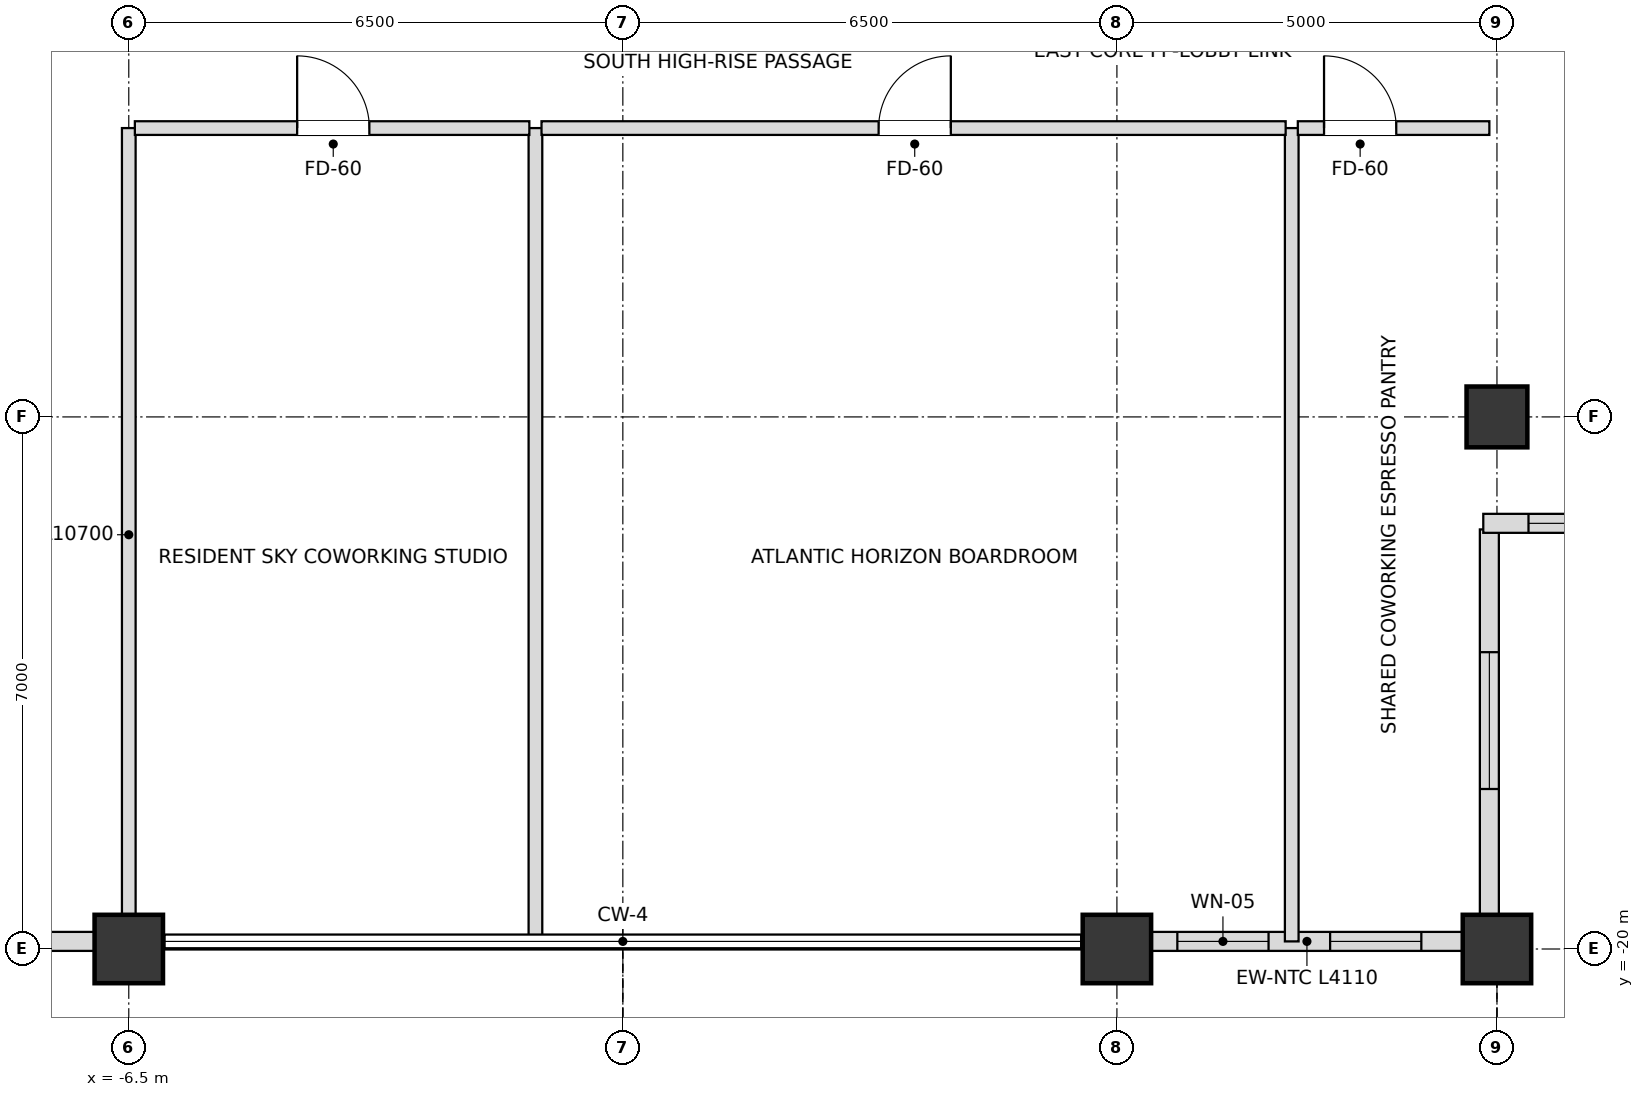
"""IFC4 building model, lengths in metres.
Left out: names, types, materials, properties, quantities, classifications, styles, units other than length and angle.
Written with IfcOpenShell. Run it as: python <this file> out.ifc"""

import sys

from ifc_helpers import new_model, si_unit, direction, frame, frame_2d, origin, origin_2d, place, context, subcontext, project, spatial, rectangle, extrude, element, fill, save


model = new_model("IFC4")
c1 = context("Model", 3, precision=1e-05, world=origin(), true_north=direction((0.0, 1.0)))
c2 = subcontext(c1, "Body", "Model", "MODEL_VIEW")
j1 = project(units=[si_unit("LENGTHUNIT", "METRE"), si_unit("PLANEANGLEUNIT", "RADIAN")], contexts=[c1])
p1 = place(None, origin())
s1 = spatial("IfcSite", under=j1, at=p1, CompositionType="ELEMENT")
p2 = place(p1, origin())
s2 = spatial("IfcBuilding", under=s1, at=p2, CompositionType="ELEMENT")
p3 = place(p2, frame((0.0, 0.0, 251.1)))
s3 = spatial("IfcBuildingStorey", under=s2, at=p3, CompositionType="ELEMENT", Elevation=251.1)
for number, where, z_axis, x_axis in (
    (1, (-6.5, -20.0, 0.0), (0.0, 0.0, 1.0), (1.0, 0.0, 0.0)),
    (2, (6.5, -20.0, 0.0), (0.0, 0.0, 1.0), (1.0, 0.0, 0.0)),
    (3, (11.5, -20.0, 0.0), (0.0, 0.0, 1.0), (1.0, 0.0, 0.0)),
):
    element("IfcColumn", number, at=place(p3, frame(where, z_axis=z_axis, x_axis=x_axis)), inside=s3, PredefinedType="USERDEFINED", context=c2, shape_type="SweptSolid", body=[
        extrude(rectangle(XDim=0.9, YDim=0.9, at=origin_2d()), origin(), (0.0, 0.0, 1.0), 3.6),
    ])
p4 = place(p3, frame((11.5, -13.0, 0.0), z_axis=(0.0, 0.0, 1.0), x_axis=(1.0, 0.0, 0.0)))
e4 = element("IfcColumn", 4, at=p4, inside=s3, PredefinedType="COLUMN", context=c2, shape_type="SweptSolid", body=[
    extrude(rectangle(XDim=0.8, YDim=0.8, at=origin_2d()), origin(), (0.0, 0.0, 1.0), 3.6),
])
p5 = place(p3, frame((-11.055, -19.9, 0.0), z_axis=(0.0, 0.0, 1.0), x_axis=(1.0, 0.0, 0.0)))
e5 = element("IfcWall", 5, at=p5, inside=s3, PredefinedType="SOLIDWALL", context=c2, shape_type="SweptSolid", body=[
    extrude(rectangle(XDim=4.11, YDim=0.25, at=frame_2d((2.055, 0.0))), origin(), (0.0, 0.0, 1.0), 2.748),
])
p6 = place(p5, frame((1.155, 0.0, 0.72)))
e6 = element("IfcOpeningElement", 6, at=p6, cuts=e5, PredefinedType="OPENING", context=c2, shape_type="SweptSolid", body=[
    extrude(rectangle(XDim=1.8, YDim=1.68, at=frame_2d((0.9, 0.84))), frame((0.0, 0.135, 0.0), z_axis=(0.0, -1.0, 0.0), x_axis=(1.0, 0.0, 0.0)), (0.0, 0.0, 1.0), 0.27),
])
p7 = place(p3, frame((6.945, -19.9, 0.0), z_axis=(0.0, 0.0, 1.0), x_axis=(1.0, 0.0, 0.0)))
e7 = element("IfcWall", 7, at=p7, inside=s3, PredefinedType="SOLIDWALL", context=c2, shape_type="SweptSolid", body=[
    extrude(rectangle(XDim=4.11, YDim=0.25, at=frame_2d((2.055, 0.0))), origin(), (0.0, 0.0, 1.0), 2.748),
])
p8 = place(p7, frame((0.35, 0.0, 0.72)))
e8 = element("IfcOpeningElement", 8, at=p8, cuts=e7, PredefinedType="OPENING", context=c2, shape_type="SweptSolid", body=[
    extrude(rectangle(XDim=1.2, YDim=1.68, at=frame_2d((0.6, 0.84))), frame((0.0, 0.135, 0.0), z_axis=(0.0, -1.0, 0.0), x_axis=(1.0, 0.0, 0.0)), (0.0, 0.0, 1.0), 0.27),
])
p9 = place(p7, frame((2.36, 0.0, 0.72)))
e9 = element("IfcOpeningElement", 9, at=p9, cuts=e7, PredefinedType="OPENING", context=c2, shape_type="SweptSolid", body=[
    extrude(rectangle(XDim=1.2, YDim=1.68, at=frame_2d((0.6, 0.84))), frame((0.0, 0.135, 0.0), z_axis=(0.0, -1.0, 0.0), x_axis=(1.0, 0.0, 0.0)), (0.0, 0.0, 1.0), 0.27),
])
p10 = place(p3, frame((11.4, -19.82, 0.0), z_axis=(0.0, 0.0, 1.0), x_axis=(0.0, 1.0, 0.0)))
e10 = element("IfcWall", 10, at=p10, inside=s3, PredefinedType="SOLIDWALL", context=c2, shape_type="SweptSolid", body=[
    extrude(rectangle(XDim=5.34, YDim=0.25, at=frame_2d((2.67, 0.0))), origin(), (0.0, 0.0, 1.0), 2.748),
])
p11 = place(p10, frame((1.925, 0.0, 0.72)))
e11 = element("IfcOpeningElement", 11, at=p11, cuts=e10, PredefinedType="OPENING", context=c2, shape_type="SweptSolid", body=[
    extrude(rectangle(XDim=1.8, YDim=1.68, at=frame_2d((0.9, 0.84))), frame((0.0, 0.135, 0.0), z_axis=(0.0, -1.0, 0.0), x_axis=(1.0, 0.0, 0.0)), (0.0, 0.0, 1.0), 0.27),
])
p12 = place(p3, frame((11.32, -14.4, 0.0), z_axis=(0.0, 0.0, 1.0), x_axis=(1.0, 0.0, 0.0)))
e12 = element("IfcWall", 12, at=p12, inside=s3, PredefinedType="SOLIDWALL", context=c2, shape_type="SweptSolid", body=[
    extrude(rectangle(XDim=5.66, YDim=0.25, at=frame_2d((2.83, 0.0))), origin(), (0.0, 0.0, 1.0), 2.748),
])
p13 = place(p12, frame((0.595, 0.0, 0.72)))
e13 = element("IfcOpeningElement", 13, at=p13, cuts=e12, PredefinedType="OPENING", context=c2, shape_type="SweptSolid", body=[
    extrude(rectangle(XDim=1.8, YDim=1.68, at=frame_2d((0.9, 0.84))), frame((0.0, 0.135, 0.0), z_axis=(0.0, -1.0, 0.0), x_axis=(1.0, 0.0, 0.0)), (0.0, 0.0, 1.0), 0.27),
])
p14 = place(p12, frame((3.265, 0.0, 0.72)))
e14 = element("IfcOpeningElement", 14, at=p14, cuts=e12, PredefinedType="OPENING", context=c2, shape_type="SweptSolid", body=[
    extrude(rectangle(XDim=1.8, YDim=1.68, at=frame_2d((0.9, 0.84))), frame((0.0, 0.135, 0.0), z_axis=(0.0, -1.0, 0.0), x_axis=(1.0, 0.0, 0.0)), (0.0, 0.0, 1.0), 0.27),
])
p15 = place(p3, frame((-6.5, -19.9, 0.0), z_axis=(0.0, 0.0, 1.0), x_axis=(0.0, 1.0, 0.0)))
e15 = element("IfcWall", 15, at=p15, inside=s3, PredefinedType="PARTITIONING", context=c2, shape_type="SweptSolid", body=[
    extrude(rectangle(XDim=10.7, YDim=0.18, at=frame_2d((5.35, 0.0))), origin(), (0.0, 0.0, 1.0), 2.826),
])
p16 = place(p3, frame((-1.15, -19.9, 0.0), z_axis=(0.0, 0.0, 1.0), x_axis=(0.0, 1.0, 0.0)))
e16 = element("IfcWall", 16, at=p16, inside=s3, PredefinedType="PARTITIONING", context=c2, shape_type="SweptSolid", body=[
    extrude(rectangle(XDim=10.7, YDim=0.18, at=frame_2d((5.35, 0.0))), origin(), (0.0, 0.0, 1.0), 3.018),
])
p17 = place(p3, frame((8.8, -19.9, 0.0), z_axis=(0.0, 0.0, 1.0), x_axis=(0.0, 1.0, 0.0)))
e17 = element("IfcWall", 17, at=p17, inside=s3, PredefinedType="PARTITIONING", context=c2, shape_type="SweptSolid", body=[
    extrude(rectangle(XDim=10.7, YDim=0.18, at=frame_2d((5.35, 0.0))), origin(), (0.0, 0.0, 1.0), 2.826),
])
p18 = place(p3, frame((-6.42, -9.2, 0.0), z_axis=(0.0, 0.0, 1.0), x_axis=(1.0, 0.0, 0.0)))
e18 = element("IfcWall", 18, at=p18, inside=s3, PredefinedType="PARTITIONING", context=c2, shape_type="SweptSolid", body=[
    extrude(rectangle(XDim=5.19, YDim=0.18, at=frame_2d((2.595, 0.0))), origin(), (0.0, 0.0, 1.0), 3.38),
])
p19 = place(p18, frame((2.135, 0.0, 0.0)))
e19 = element("IfcOpeningElement", 19, at=p19, cuts=e18, PredefinedType="OPENING", context=c2, shape_type="SweptSolid", body=[
    extrude(rectangle(XDim=0.95, YDim=2.15, at=frame_2d((0.475, 1.075))), frame((0.0, 0.1, 0.0), z_axis=(0.0, -1.0, 0.0), x_axis=(1.0, 0.0, 0.0)), (0.0, 0.0, 1.0), 0.2),
])
p20 = place(p3, frame((-1.07, -9.2, 0.0), z_axis=(0.0, 0.0, 1.0), x_axis=(1.0, 0.0, 0.0)))
e20 = element("IfcWall", 20, at=p20, inside=s3, PredefinedType="PARTITIONING", context=c2, shape_type="SweptSolid", body=[
    extrude(rectangle(XDim=9.79, YDim=0.18, at=frame_2d((4.895, 0.0))), origin(), (0.0, 0.0, 1.0), 2.826),
])
p21 = place(p20, frame((4.435, 0.0, 0.0)))
e21 = element("IfcOpeningElement", 21, at=p21, cuts=e20, PredefinedType="OPENING", context=c2, shape_type="SweptSolid", body=[
    extrude(rectangle(XDim=0.95, YDim=2.15, at=frame_2d((0.475, 1.075))), frame((0.0, 0.1, 0.0), z_axis=(0.0, -1.0, 0.0), x_axis=(1.0, 0.0, 0.0)), (0.0, 0.0, 1.0), 0.2),
])
p22 = place(p3, frame((8.88, -9.2, 0.0), z_axis=(0.0, 0.0, 1.0), x_axis=(1.0, 0.0, 0.0)))
e22 = element("IfcWall", 22, at=p22, inside=s3, PredefinedType="PARTITIONING", context=c2, shape_type="SweptSolid", body=[
    extrude(rectangle(XDim=2.52, YDim=0.18, at=frame_2d((1.26, 0.0))), origin(), (0.0, 0.0, 1.0), 3.38),
])
p23 = place(p22, frame((0.345, 0.0, 0.0)))
e23 = element("IfcOpeningElement", 23, at=p23, cuts=e22, PredefinedType="OPENING", context=c2, shape_type="SweptSolid", body=[
    extrude(rectangle(XDim=0.95, YDim=2.15, at=frame_2d((0.475, 1.075))), frame((0.0, 0.1, 0.0), z_axis=(0.0, -1.0, 0.0), x_axis=(1.0, 0.0, 0.0)), (0.0, 0.0, 1.0), 0.2),
])
p24 = place(p8, origin())
e24 = element("IfcWindow", 24, at=p24, inside=s3, PartitioningType="SINGLE_PANEL", PredefinedType="WINDOW", context=c2, shape_type="SweptSolid", body=[
    extrude(rectangle(XDim=1.2, YDim=1.68, at=frame_2d((0.6, 0.84))), frame((0.0, 0.03, 0.0), z_axis=(0.0, -1.0, 0.0), x_axis=(1.0, 0.0, 0.0)), (0.0, 0.0, 1.0), 0.06),
])
fill(e8, e24)
p25 = place(p9, origin())
e25 = element("IfcWindow", 25, at=p25, inside=s3, PartitioningType="SINGLE_PANEL", PredefinedType="WINDOW", context=c2, shape_type="SweptSolid", body=[
    extrude(rectangle(XDim=1.2, YDim=1.68, at=frame_2d((0.6, 0.84))), frame((0.0, 0.03, 0.0), z_axis=(0.0, -1.0, 0.0), x_axis=(1.0, 0.0, 0.0)), (0.0, 0.0, 1.0), 0.06),
])
fill(e9, e25)
p26 = place(p11, origin())
e26 = element("IfcWindow", 26, at=p26, inside=s3, PartitioningType="SINGLE_PANEL", PredefinedType="WINDOW", context=c2, shape_type="SweptSolid", body=[
    extrude(rectangle(XDim=1.8, YDim=1.68, at=frame_2d((0.9, 0.84))), frame((0.0, 0.03, 0.0), z_axis=(0.0, -1.0, 0.0), x_axis=(1.0, 0.0, 0.0)), (0.0, 0.0, 1.0), 0.06),
])
fill(e11, e26)
p27 = place(p13, origin())
e27 = element("IfcWindow", 27, at=p27, inside=s3, PartitioningType="SINGLE_PANEL", PredefinedType="WINDOW", context=c2, shape_type="SweptSolid", body=[
    extrude(rectangle(XDim=1.8, YDim=1.68, at=frame_2d((0.9, 0.84))), frame((0.0, 0.03, 0.0), z_axis=(0.0, -1.0, 0.0), x_axis=(1.0, 0.0, 0.0)), (0.0, 0.0, 1.0), 0.06),
])
fill(e13, e27)
p28 = place(p19, origin())
e28 = element("IfcDoor", 28, at=p28, inside=s3, OperationType="SINGLE_SWING_LEFT", PredefinedType="DOOR", context=c2, shape_type="SweptSolid", body=[
    extrude(rectangle(XDim=0.95, YDim=2.15, at=frame_2d((0.475, 1.075))), frame((0.0, 0.025, 0.0), z_axis=(0.0, -1.0, 0.0), x_axis=(1.0, 0.0, 0.0)), (0.0, 0.0, 1.0), 0.05),
])
fill(e19, e28)
p29 = place(p21, origin())
e29 = element("IfcDoor", 29, at=p29, inside=s3, OperationType="SINGLE_SWING_RIGHT", PredefinedType="DOOR", context=c2, shape_type="SweptSolid", body=[
    extrude(rectangle(XDim=0.95, YDim=2.15, at=frame_2d((0.475, 1.075))), frame((0.0, 0.025, 0.0), z_axis=(0.0, -1.0, 0.0), x_axis=(1.0, 0.0, 0.0)), (0.0, 0.0, 1.0), 0.05),
])
fill(e21, e29)
p30 = place(p23, origin())
e30 = element("IfcDoor", 30, at=p30, inside=s3, OperationType="SINGLE_SWING_LEFT", PredefinedType="DOOR", context=c2, shape_type="SweptSolid", body=[
    extrude(rectangle(XDim=0.95, YDim=2.15, at=frame_2d((0.475, 1.075))), frame((0.0, 0.025, 0.0), z_axis=(0.0, -1.0, 0.0), x_axis=(1.0, 0.0, 0.0)), (0.0, 0.0, 1.0), 0.05),
])
fill(e23, e30)
save(model, sys.argv[1])
